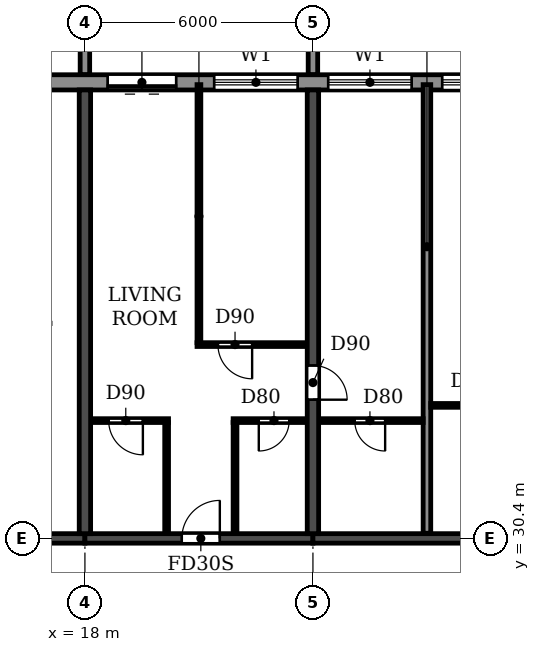
"""IFC4 building model, lengths in metres.
Left out: names, types, materials, properties, quantities, classifications, styles, units other than length and angle.
Written with IfcOpenShell. Run it as: python <this file> out.ifc"""

import sys

from ifc_helpers import new_model, si_unit, direction, frame, frame_2d, origin, place, context, subcontext, project, spatial, polyline, rectangle, outline, extrude, source, transform, mapped, element, fill, save


model = new_model("IFC4")
c1 = context("Model", 3, precision=1e-05, world=origin(), true_north=direction((0.0, 1.0)))
c2 = subcontext(c1, "Body", "Model", "MODEL_VIEW")
j1 = project(units=[si_unit("LENGTHUNIT", "METRE"), si_unit("PLANEANGLEUNIT", "RADIAN")], contexts=[c1])
p1 = place(None, origin())
s1 = spatial("IfcSite", under=j1, at=p1, CompositionType="ELEMENT")
p2 = place(p1, origin())
s2 = spatial("IfcBuilding", under=s1, at=p2, CompositionType="ELEMENT")
p3 = place(p2, frame((0.0, 0.0, 132.3)))
s3 = spatial("IfcBuildingStorey", under=s2, at=p3, CompositionType="ELEMENT", Elevation=132.3)
p4 = place(p3, frame((18.0, 30.525, 0.0), z_axis=(0.0, 0.0, 1.0), x_axis=(0.0, 1.0, 0.0)))
e1 = element("IfcWall", 1, at=p4, inside=s3, PredefinedType="SHEAR", context=c2, shape_type="SweptSolid", body=[
    extrude(rectangle(XDim=11.675, YDim=0.3, at=frame_2d((5.837, 0.0))), origin(), (0.0, 0.0, 1.0), 3.07),
])
p5 = place(p3, frame((24.0, 30.525, 0.0), z_axis=(0.0, 0.0, 1.0), x_axis=(0.0, 1.0, 0.0)))
e2 = element("IfcWall", 2, at=p5, inside=s3, PredefinedType="SHEAR", context=c2, shape_type="SweptSolid", body=[
    extrude(rectangle(XDim=11.675, YDim=0.3, at=frame_2d((5.837, 0.0))), origin(), (0.0, 0.0, 1.0), 3.07),
])
p6 = place(p5, frame((3.525, 0.0, 0.0)))
e3 = element("IfcOpeningElement", 3, at=p6, cuts=e2, PredefinedType="OPENING", context=c2, shape_type="SweptSolid", body=[
    extrude(rectangle(XDim=0.9, YDim=2.1, at=frame_2d((0.45, 1.05))), frame((0.0, 0.16, 0.0), z_axis=(0.0, -1.0, 0.0), x_axis=(1.0, 0.0, 0.0)), (0.0, 0.0, 1.0), 0.32),
])
p7 = place(p3, frame((12.2, 30.4, 0.0), z_axis=(0.0, 0.0, 1.0), x_axis=(1.0, 0.0, 0.0)))
e4 = element("IfcWall", 4, at=p7, inside=s3, PredefinedType="SHEAR", context=c2, shape_type="SweptSolid", body=[
    extrude(rectangle(XDim=5.8, YDim=0.25, at=frame_2d((2.9, 0.0))), origin(), (0.0, 0.0, 1.0), 2.47),
])
p8 = place(p7, frame((2.3, 0.0, 0.0)))
e5 = element("IfcOpeningElement", 5, at=p8, cuts=e4, PredefinedType="OPENING", context=c2, shape_type="SweptSolid", body=[
    extrude(rectangle(XDim=1.0, YDim=2.1, at=frame_2d((0.5, 1.05))), frame((0.0, 0.135, 0.0), z_axis=(0.0, -1.0, 0.0), x_axis=(1.0, 0.0, 0.0)), (0.0, 0.0, 1.0), 0.27),
])
p9 = place(p3, frame((18.0, 30.4, 0.0), z_axis=(0.0, 0.0, 1.0), x_axis=(1.0, 0.0, 0.0)))
e6 = element("IfcWall", 6, at=p9, inside=s3, PredefinedType="SHEAR", context=c2, shape_type="SweptSolid", body=[
    extrude(rectangle(XDim=6.0, YDim=0.25, at=frame_2d((3.0, 0.0))), origin(), (0.0, 0.0, 1.0), 2.47),
])
p10 = place(p9, frame((2.55, 0.0, 0.0)))
e7 = element("IfcOpeningElement", 7, at=p10, cuts=e6, PredefinedType="OPENING", context=c2, shape_type="SweptSolid", body=[
    extrude(rectangle(XDim=1.0, YDim=2.1, at=frame_2d((0.5, 1.05))), frame((0.0, 0.135, 0.0), z_axis=(0.0, -1.0, 0.0), x_axis=(1.0, 0.0, 0.0)), (0.0, 0.0, 1.0), 0.27),
])
p11 = place(p3, frame((24.0, 30.4, 0.0), z_axis=(0.0, 0.0, 1.0), x_axis=(1.0, 0.0, 0.0)))
e8 = element("IfcWall", 8, at=p11, inside=s3, PredefinedType="SHEAR", context=c2, shape_type="SweptSolid", body=[
    extrude(rectangle(XDim=6.0, YDim=0.25, at=frame_2d((3.0, 0.0))), origin(), (0.0, 0.0, 1.0), 2.47),
])
p12 = place(p3, frame((85.317, 42.4, 0.0), z_axis=(0.0, 0.0, 1.0), x_axis=(-1.0, 0.0, 0.0)))
e9 = element("IfcWall", 9, at=p12, inside=s3, PredefinedType="STANDARD", context=c2, shape_type="SweptSolid", body=[
    extrude(rectangle(XDim=68.634, YDim=0.4, at=frame_2d((34.317, 0.0))), origin(), (0.0, 0.0, 1.0), 3.07),
])
p13 = place(p12, frame((64.917, 0.0, 0.0)))
e10 = element("IfcOpeningElement", 10, at=p13, cuts=e9, PredefinedType="OPENING", context=c2, shape_type="SweptSolid", body=[
    extrude(rectangle(XDim=1.8, YDim=2.4, at=frame_2d((0.9, 1.2))), frame((0.0, 0.21, 0.0), z_axis=(0.0, -1.0, 0.0), x_axis=(1.0, 0.0, 0.0)), (0.0, 0.0, 1.0), 0.42),
])
p14 = place(p12, frame((61.717, 0.0, 0.9)))
e11 = element("IfcOpeningElement", 11, at=p14, cuts=e9, PredefinedType="OPENING", context=c2, shape_type="SweptSolid", body=[
    extrude(rectangle(XDim=2.2, YDim=1.5, at=frame_2d((1.1, 0.75))), frame((0.0, 0.21, 0.0), z_axis=(0.0, -1.0, 0.0), x_axis=(1.0, 0.0, 0.0)), (0.0, 0.0, 1.0), 0.42),
])
p15 = place(p12, frame((58.717, 0.0, 0.9)))
e12 = element("IfcOpeningElement", 12, at=p15, cuts=e9, PredefinedType="OPENING", context=c2, shape_type="SweptSolid", body=[
    extrude(rectangle(XDim=2.2, YDim=1.5, at=frame_2d((1.1, 0.75))), frame((0.0, 0.21, 0.0), z_axis=(0.0, -1.0, 0.0), x_axis=(1.0, 0.0, 0.0)), (0.0, 0.0, 1.0), 0.42),
])
p16 = place(p12, frame((55.717, 0.0, 0.9)))
e13 = element("IfcOpeningElement", 13, at=p16, cuts=e9, PredefinedType="OPENING", context=c2, shape_type="SweptSolid", body=[
    extrude(rectangle(XDim=2.2, YDim=1.5, at=frame_2d((1.1, 0.75))), frame((0.0, 0.21, 0.0), z_axis=(0.0, -1.0, 0.0), x_axis=(1.0, 0.0, 0.0)), (0.0, 0.0, 1.0), 0.42),
])
p17 = place(p12, frame((52.917, 0.0, 0.0)))
e14 = element("IfcOpeningElement", 14, at=p17, cuts=e9, PredefinedType="OPENING", context=c2, shape_type="SweptSolid", body=[
    extrude(rectangle(XDim=1.8, YDim=2.4, at=frame_2d((0.9, 1.2))), frame((0.0, 0.21, 0.0), z_axis=(0.0, -1.0, 0.0), x_axis=(1.0, 0.0, 0.0)), (0.0, 0.0, 1.0), 0.42),
])
p18 = place(p12, frame((49.717, 0.0, 0.9)))
e15 = element("IfcOpeningElement", 15, at=p18, cuts=e9, PredefinedType="OPENING", context=c2, shape_type="SweptSolid", body=[
    extrude(rectangle(XDim=2.2, YDim=1.5, at=frame_2d((1.1, 0.75))), frame((0.0, 0.21, 0.0), z_axis=(0.0, -1.0, 0.0), x_axis=(1.0, 0.0, 0.0)), (0.0, 0.0, 1.0), 0.42),
])
p19 = place(p12, frame((46.717, 0.0, 0.9)))
e16 = element("IfcOpeningElement", 16, at=p19, cuts=e9, PredefinedType="OPENING", context=c2, shape_type="SweptSolid", body=[
    extrude(rectangle(XDim=2.2, YDim=1.5, at=frame_2d((1.1, 0.75))), frame((0.0, 0.21, 0.0), z_axis=(0.0, -1.0, 0.0), x_axis=(1.0, 0.0, 0.0)), (0.0, 0.0, 1.0), 0.42),
])
p20 = place(p12, frame((43.917, 0.0, 0.0)))
e17 = element("IfcOpeningElement", 17, at=p20, cuts=e9, PredefinedType="OPENING", context=c2, shape_type="SweptSolid", body=[
    extrude(rectangle(XDim=1.8, YDim=2.4, at=frame_2d((0.9, 1.2))), frame((0.0, 0.21, 0.0), z_axis=(0.0, -1.0, 0.0), x_axis=(1.0, 0.0, 0.0)), (0.0, 0.0, 1.0), 0.42),
])
p21 = place(p12, frame((40.917, 0.0, 0.0)))
e18 = element("IfcOpeningElement", 18, at=p21, cuts=e9, PredefinedType="OPENING", context=c2, shape_type="SweptSolid", body=[
    extrude(rectangle(XDim=1.8, YDim=2.4, at=frame_2d((0.9, 1.2))), frame((0.0, 0.21, 0.0), z_axis=(0.0, -1.0, 0.0), x_axis=(1.0, 0.0, 0.0)), (0.0, 0.0, 1.0), 0.42),
])
p22 = place(p12, frame((37.717, 0.0, 0.9)))
e19 = element("IfcOpeningElement", 19, at=p22, cuts=e9, PredefinedType="OPENING", context=c2, shape_type="SweptSolid", body=[
    extrude(rectangle(XDim=2.2, YDim=1.5, at=frame_2d((1.1, 0.75))), frame((0.0, 0.21, 0.0), z_axis=(0.0, -1.0, 0.0), x_axis=(1.0, 0.0, 0.0)), (0.0, 0.0, 1.0), 0.42),
])
p23 = place(p12, frame((34.717, 0.0, 0.9)))
e20 = element("IfcOpeningElement", 20, at=p23, cuts=e9, PredefinedType="OPENING", context=c2, shape_type="SweptSolid", body=[
    extrude(rectangle(XDim=2.2, YDim=1.5, at=frame_2d((1.1, 0.75))), frame((0.0, 0.21, 0.0), z_axis=(0.0, -1.0, 0.0), x_axis=(1.0, 0.0, 0.0)), (0.0, 0.0, 1.0), 0.42),
])
p24 = place(p12, frame((31.717, 0.0, 0.9)))
e21 = element("IfcOpeningElement", 21, at=p24, cuts=e9, PredefinedType="OPENING", context=c2, shape_type="SweptSolid", body=[
    extrude(rectangle(XDim=2.2, YDim=1.5, at=frame_2d((1.1, 0.75))), frame((0.0, 0.21, 0.0), z_axis=(0.0, -1.0, 0.0), x_axis=(1.0, 0.0, 0.0)), (0.0, 0.0, 1.0), 0.42),
])
p25 = place(p12, frame((28.917, 0.0, 0.0)))
e22 = element("IfcOpeningElement", 22, at=p25, cuts=e9, PredefinedType="OPENING", context=c2, shape_type="SweptSolid", body=[
    extrude(rectangle(XDim=1.8, YDim=2.4, at=frame_2d((0.9, 1.2))), frame((0.0, 0.21, 0.0), z_axis=(0.0, -1.0, 0.0), x_axis=(1.0, 0.0, 0.0)), (0.0, 0.0, 1.0), 0.42),
])
p26 = place(p12, frame((25.717, 0.0, 0.9)))
e23 = element("IfcOpeningElement", 23, at=p26, cuts=e9, PredefinedType="OPENING", context=c2, shape_type="SweptSolid", body=[
    extrude(rectangle(XDim=2.2, YDim=1.5, at=frame_2d((1.1, 0.75))), frame((0.0, 0.21, 0.0), z_axis=(0.0, -1.0, 0.0), x_axis=(1.0, 0.0, 0.0)), (0.0, 0.0, 1.0), 0.42),
])
p27 = place(p12, frame((22.717, 0.0, 0.9)))
e24 = element("IfcOpeningElement", 24, at=p27, cuts=e9, PredefinedType="OPENING", context=c2, shape_type="SweptSolid", body=[
    extrude(rectangle(XDim=2.2, YDim=1.5, at=frame_2d((1.1, 0.75))), frame((0.0, 0.21, 0.0), z_axis=(0.0, -1.0, 0.0), x_axis=(1.0, 0.0, 0.0)), (0.0, 0.0, 1.0), 0.42),
])
p28 = place(p12, frame((19.717, 0.0, 0.9)))
e25 = element("IfcOpeningElement", 25, at=p28, cuts=e9, PredefinedType="OPENING", context=c2, shape_type="SweptSolid", body=[
    extrude(rectangle(XDim=2.2, YDim=1.5, at=frame_2d((1.1, 0.75))), frame((0.0, 0.21, 0.0), z_axis=(0.0, -1.0, 0.0), x_axis=(1.0, 0.0, 0.0)), (0.0, 0.0, 1.0), 0.42),
])
p29 = place(p12, frame((16.717, 0.0, 0.9)))
e26 = element("IfcOpeningElement", 26, at=p29, cuts=e9, PredefinedType="OPENING", context=c2, shape_type="SweptSolid", body=[
    extrude(rectangle(XDim=2.2, YDim=1.5, at=frame_2d((1.1, 0.75))), frame((0.0, 0.21, 0.0), z_axis=(0.0, -1.0, 0.0), x_axis=(1.0, 0.0, 0.0)), (0.0, 0.0, 1.0), 0.42),
])
p30 = place(p12, frame((13.917, 0.0, 0.0)))
e27 = element("IfcOpeningElement", 27, at=p30, cuts=e9, PredefinedType="OPENING", context=c2, shape_type="SweptSolid", body=[
    extrude(rectangle(XDim=1.8, YDim=2.4, at=frame_2d((0.9, 1.2))), frame((0.0, 0.21, 0.0), z_axis=(0.0, -1.0, 0.0), x_axis=(1.0, 0.0, 0.0)), (0.0, 0.0, 1.0), 0.42),
])
p31 = place(p12, frame((10.717, 0.0, 0.9)))
e28 = element("IfcOpeningElement", 28, at=p31, cuts=e9, PredefinedType="OPENING", context=c2, shape_type="SweptSolid", body=[
    extrude(rectangle(XDim=2.2, YDim=1.5, at=frame_2d((1.1, 0.75))), frame((0.0, 0.21, 0.0), z_axis=(0.0, -1.0, 0.0), x_axis=(1.0, 0.0, 0.0)), (0.0, 0.0, 1.0), 0.42),
])
p32 = place(p12, frame((7.917, 0.0, 0.0)))
e29 = element("IfcOpeningElement", 29, at=p32, cuts=e9, PredefinedType="OPENING", context=c2, shape_type="SweptSolid", body=[
    extrude(rectangle(XDim=1.8, YDim=2.4, at=frame_2d((0.9, 1.2))), frame((0.0, 0.21, 0.0), z_axis=(0.0, -1.0, 0.0), x_axis=(1.0, 0.0, 0.0)), (0.0, 0.0, 1.0), 0.42),
])
p33 = place(p12, frame((4.717, 0.0, 0.9)))
e30 = element("IfcOpeningElement", 30, at=p33, cuts=e9, PredefinedType="OPENING", context=c2, shape_type="SweptSolid", body=[
    extrude(rectangle(XDim=2.2, YDim=1.5, at=frame_2d((1.1, 0.75))), frame((0.0, 0.21, 0.0), z_axis=(0.0, -1.0, 0.0), x_axis=(1.0, 0.0, 0.0)), (0.0, 0.0, 1.0), 0.42),
])
p34 = place(p12, frame((1.917, 0.0, 0.0)))
e31 = element("IfcOpeningElement", 31, at=p34, cuts=e9, PredefinedType="OPENING", context=c2, shape_type="SweptSolid", body=[
    extrude(rectangle(XDim=1.8, YDim=2.4, at=frame_2d((0.9, 1.2))), frame((0.0, 0.21, 0.0), z_axis=(0.0, -1.0, 0.0), x_axis=(1.0, 0.0, 0.0)), (0.0, 0.0, 1.0), 0.42),
])
m1 = source(origin(), c2, "Body", "SweptSolid", [
    extrude(outline(polyline([(0.0, 0.0), (0.25, 0.0), (0.25, 3.1), (0.0, 3.1), (0.0, 0.0)])), origin(), (0.0, 0.0, 1.0), 3.1),
])
for number, where in (
    (32, (17.875, 42.6, 0.0)),
    (33, (23.875, 42.6, 0.0)),
):
    element("IfcWall", number, at=place(p3, frame(where)), inside=s3, PredefinedType="STANDARD", context=c2, shape_type="MappedRepresentation", body=[
        mapped(m1, transform((0.0, 0.0, 0.0))),
    ])
p35 = place(p3, frame((27.0, 30.535, 0.0), z_axis=(0.0, 0.0, 1.0), x_axis=(0.0, 1.0, 0.0)))
e34 = element("IfcWall", 34, at=p35, inside=s3, PredefinedType="PARTITIONING", context=c2, shape_type="SweptSolid", body=[
    extrude(rectangle(XDim=11.805, YDim=0.2, at=frame_2d((5.903, 0.0))), origin(), (0.0, 0.0, 1.0), 3.07),
])
p36 = place(p3, frame((18.16, 33.5, 0.0), z_axis=(0.0, 0.0, 1.0), x_axis=(1.0, 0.0, 0.0)))
e35 = element("IfcWall", 35, at=p36, inside=s3, PredefinedType="PARTITIONING", context=c2, shape_type="SweptSolid", body=[
    extrude(rectangle(XDim=2.04, YDim=0.1, at=frame_2d((1.02, 0.0))), origin(), (0.0, 0.0, 1.0), 3.07),
])
p37 = place(p36, frame((0.465, 0.0, 0.0)))
e36 = element("IfcOpeningElement", 36, at=p37, cuts=e35, PredefinedType="OPENING", context=c2, shape_type="SweptSolid", body=[
    extrude(rectangle(XDim=0.9, YDim=2.1, at=frame_2d((0.45, 1.05))), frame((0.0, 0.06, 0.0), z_axis=(0.0, -1.0, 0.0), x_axis=(1.0, 0.0, 0.0)), (0.0, 0.0, 1.0), 0.12),
])
p38 = place(p3, frame((21.9, 33.5, 0.0), z_axis=(0.0, 0.0, 1.0), x_axis=(1.0, 0.0, 0.0)))
e37 = element("IfcWall", 37, at=p38, inside=s3, PredefinedType="PARTITIONING", context=c2, shape_type="SweptSolid", body=[
    extrude(rectangle(XDim=1.94, YDim=0.1, at=frame_2d((0.97, 0.0))), origin(), (0.0, 0.0, 1.0), 3.07),
])
p39 = place(p38, frame((0.675, 0.0, 0.0)))
e38 = element("IfcOpeningElement", 38, at=p39, cuts=e37, PredefinedType="OPENING", context=c2, shape_type="SweptSolid", body=[
    extrude(rectangle(XDim=0.8, YDim=2.1, at=frame_2d((0.4, 1.05))), frame((0.0, 0.06, 0.0), z_axis=(0.0, -1.0, 0.0), x_axis=(1.0, 0.0, 0.0)), (0.0, 0.0, 1.0), 0.12),
])
p40 = place(p3, frame((24.16, 33.5, 0.0), z_axis=(0.0, 0.0, 1.0), x_axis=(1.0, 0.0, 0.0)))
e39 = element("IfcWall", 39, at=p40, inside=s3, PredefinedType="PARTITIONING", context=c2, shape_type="SweptSolid", body=[
    extrude(rectangle(XDim=2.74, YDim=0.1, at=frame_2d((1.37, 0.0))), origin(), (0.0, 0.0, 1.0), 3.07),
])
p41 = place(p40, frame((0.94, 0.0, 0.0)))
e40 = element("IfcOpeningElement", 40, at=p41, cuts=e39, PredefinedType="OPENING", context=c2, shape_type="SweptSolid", body=[
    extrude(rectangle(XDim=0.8, YDim=2.1, at=frame_2d((0.4, 1.05))), frame((0.0, 0.06, 0.0), z_axis=(0.0, -1.0, 0.0), x_axis=(1.0, 0.0, 0.0)), (0.0, 0.0, 1.0), 0.12),
])
p42 = place(p3, frame((27.1, 33.9, 0.0), z_axis=(0.0, 0.0, 1.0), x_axis=(1.0, 0.0, 0.0)))
e41 = element("IfcWall", 41, at=p42, inside=s3, PredefinedType="PARTITIONING", context=c2, shape_type="SweptSolid", body=[
    extrude(rectangle(XDim=2.74, YDim=0.1, at=frame_2d((1.37, 0.0))), origin(), (0.0, 0.0, 1.0), 3.07),
])
p43 = place(p42, frame((1.0, 0.0, 0.0)))
e42 = element("IfcOpeningElement", 42, at=p43, cuts=e41, PredefinedType="OPENING", context=c2, shape_type="SweptSolid", body=[
    extrude(rectangle(XDim=0.8, YDim=2.1, at=frame_2d((0.4, 1.05))), frame((0.0, 0.06, 0.0), z_axis=(0.0, -1.0, 0.0), x_axis=(1.0, 0.0, 0.0)), (0.0, 0.0, 1.0), 0.12),
])
p44 = place(p3, frame((20.95, 35.5, 0.0), z_axis=(0.0, 0.0, 1.0), x_axis=(1.0, 0.0, 0.0)))
e43 = element("IfcWall", 43, at=p44, inside=s3, PredefinedType="PARTITIONING", context=c2, shape_type="SweptSolid", body=[
    extrude(rectangle(XDim=2.89, YDim=0.1, at=frame_2d((1.445, 0.0))), origin(), (0.0, 0.0, 1.0), 3.07),
])
p45 = place(p44, frame((0.55, 0.0, 0.0)))
e44 = element("IfcOpeningElement", 44, at=p45, cuts=e43, PredefinedType="OPENING", context=c2, shape_type="SweptSolid", body=[
    extrude(rectangle(XDim=0.9, YDim=2.1, at=frame_2d((0.45, 1.05))), frame((0.0, 0.06, 0.0), z_axis=(0.0, -1.0, 0.0), x_axis=(1.0, 0.0, 0.0)), (0.0, 0.0, 1.0), 0.12),
])
p46 = place(p3, frame((20.15, 30.535, 0.0), z_axis=(0.0, 0.0, 1.0), x_axis=(0.0, 1.0, 0.0)))
e45 = element("IfcWall", 45, at=p46, inside=s3, PredefinedType="PARTITIONING", context=c2, shape_type="SweptSolid", body=[
    extrude(rectangle(XDim=2.915, YDim=0.1, at=frame_2d((1.458, 0.0))), origin(), (0.0, 0.0, 1.0), 3.07),
])
p47 = place(p3, frame((21.0, 35.55, 0.0), z_axis=(0.0, 0.0, 1.0), x_axis=(0.0, 1.0, 0.0)))
e46 = element("IfcWall", 46, at=p47, inside=s3, PredefinedType="PARTITIONING", context=c2, shape_type="SweptSolid", body=[
    extrude(rectangle(XDim=6.79, YDim=0.1, at=frame_2d((3.395, 0.0))), origin(), (0.0, 0.0, 1.0), 3.07),
])
p48 = place(p3, frame((21.95, 30.535, 0.0), z_axis=(0.0, 0.0, 1.0), x_axis=(0.0, 1.0, 0.0)))
e47 = element("IfcWall", 47, at=p48, inside=s3, PredefinedType="PARTITIONING", context=c2, shape_type="SweptSolid", body=[
    extrude(rectangle(XDim=2.915, YDim=0.1, at=frame_2d((1.458, 0.0))), origin(), (0.0, 0.0, 1.0), 3.07),
])
p49 = place(p13, origin())
e48 = element("IfcDoor", 48, at=p49, inside=s3, OperationType="DOUBLE_DOOR_SLIDING", PredefinedType="DOOR", context=c2, shape_type="SweptSolid", body=[
    extrude(rectangle(XDim=1.8, YDim=2.4, at=frame_2d((0.9, 1.2))), frame((0.0, 0.025, 0.0), z_axis=(0.0, -1.0, 0.0), x_axis=(1.0, 0.0, 0.0)), (0.0, 0.0, 1.0), 0.05),
])
fill(e10, e48)
p50 = place(p14, origin())
e49 = element("IfcWindow", 49, at=p50, inside=s3, PartitioningType="DOUBLE_PANEL_HORIZONTAL", PredefinedType="WINDOW", context=c2, shape_type="SweptSolid", body=[
    extrude(rectangle(XDim=2.2, YDim=1.5, at=frame_2d((1.1, 0.75))), frame((0.0, 0.03, 0.0), z_axis=(0.0, -1.0, 0.0), x_axis=(1.0, 0.0, 0.0)), (0.0, 0.0, 1.0), 0.06),
])
fill(e11, e49)
p51 = place(p15, origin())
e50 = element("IfcWindow", 50, at=p51, inside=s3, PartitioningType="DOUBLE_PANEL_HORIZONTAL", PredefinedType="WINDOW", context=c2, shape_type="SweptSolid", body=[
    extrude(rectangle(XDim=2.2, YDim=1.5, at=frame_2d((1.1, 0.75))), frame((0.0, 0.03, 0.0), z_axis=(0.0, -1.0, 0.0), x_axis=(1.0, 0.0, 0.0)), (0.0, 0.0, 1.0), 0.06),
])
fill(e12, e50)
p52 = place(p16, origin())
e51 = element("IfcWindow", 51, at=p52, inside=s3, PartitioningType="DOUBLE_PANEL_HORIZONTAL", PredefinedType="WINDOW", context=c2, shape_type="SweptSolid", body=[
    extrude(rectangle(XDim=2.2, YDim=1.5, at=frame_2d((1.1, 0.75))), frame((0.0, 0.03, 0.0), z_axis=(0.0, -1.0, 0.0), x_axis=(1.0, 0.0, 0.0)), (0.0, 0.0, 1.0), 0.06),
])
fill(e13, e51)
p53 = place(p41, frame((0.8, 0.0, 0.0), z_axis=(0.0, 0.0, 1.0), x_axis=(-1.0, 0.0, 0.0)))
e52 = element("IfcDoor", 52, at=p53, inside=s3, OperationType="SINGLE_SWING_LEFT", PredefinedType="DOOR", context=c2, shape_type="SweptSolid", body=[
    extrude(rectangle(XDim=0.8, YDim=2.1, at=frame_2d((0.4, 1.05))), frame((0.0, 0.025, 0.0), z_axis=(0.0, -1.0, 0.0), x_axis=(1.0, 0.0, 0.0)), (0.0, 0.0, 1.0), 0.05),
])
fill(e40, e52)
p54 = place(p37, frame((0.9, 0.0, 0.0), z_axis=(0.0, 0.0, 1.0), x_axis=(-1.0, 0.0, 0.0)))
e53 = element("IfcDoor", 53, at=p54, inside=s3, OperationType="SINGLE_SWING_LEFT", PredefinedType="DOOR", context=c2, shape_type="SweptSolid", body=[
    extrude(rectangle(XDim=0.9, YDim=2.1, at=frame_2d((0.45, 1.05))), frame((0.0, 0.025, 0.0), z_axis=(0.0, -1.0, 0.0), x_axis=(1.0, 0.0, 0.0)), (0.0, 0.0, 1.0), 0.05),
])
fill(e36, e53)
p55 = place(p10, origin())
e54 = element("IfcDoor", 54, at=p55, inside=s3, OperationType="SINGLE_SWING_RIGHT", PredefinedType="DOOR", context=c2, shape_type="SweptSolid", body=[
    extrude(rectangle(XDim=1.0, YDim=2.1, at=frame_2d((0.5, 1.05))), frame((0.0, 0.025, 0.0), z_axis=(0.0, -1.0, 0.0), x_axis=(1.0, 0.0, 0.0)), (0.0, 0.0, 1.0), 0.05),
])
fill(e7, e54)
p56 = place(p45, frame((0.9, 0.0, 0.0), z_axis=(0.0, 0.0, 1.0), x_axis=(-1.0, 0.0, 0.0)))
e55 = element("IfcDoor", 55, at=p56, inside=s3, OperationType="SINGLE_SWING_LEFT", PredefinedType="DOOR", context=c2, shape_type="SweptSolid", body=[
    extrude(rectangle(XDim=0.9, YDim=2.1, at=frame_2d((0.45, 1.05))), frame((0.0, 0.025, 0.0), z_axis=(0.0, -1.0, 0.0), x_axis=(1.0, 0.0, 0.0)), (0.0, 0.0, 1.0), 0.05),
])
fill(e44, e55)
p57 = place(p39, frame((0.8, 0.0, 0.0), z_axis=(0.0, 0.0, 1.0), x_axis=(-1.0, 0.0, 0.0)))
e56 = element("IfcDoor", 56, at=p57, inside=s3, OperationType="SINGLE_SWING_RIGHT", PredefinedType="DOOR", context=c2, shape_type="SweptSolid", body=[
    extrude(rectangle(XDim=0.8, YDim=2.1, at=frame_2d((0.4, 1.05))), frame((0.0, 0.025, 0.0), z_axis=(0.0, -1.0, 0.0), x_axis=(1.0, 0.0, 0.0)), (0.0, 0.0, 1.0), 0.05),
])
fill(e38, e56)
p58 = place(p6, frame((0.9, 0.0, 0.0), z_axis=(0.0, 0.0, 1.0), x_axis=(-1.0, 0.0, 0.0)))
e57 = element("IfcDoor", 57, at=p58, inside=s3, OperationType="SINGLE_SWING_RIGHT", PredefinedType="DOOR", context=c2, shape_type="SweptSolid", body=[
    extrude(rectangle(XDim=0.9, YDim=2.1, at=frame_2d((0.45, 1.05))), frame((0.0, 0.025, 0.0), z_axis=(0.0, -1.0, 0.0), x_axis=(1.0, 0.0, 0.0)), (0.0, 0.0, 1.0), 0.05),
])
fill(e3, e57)
save(model, sys.argv[1])
